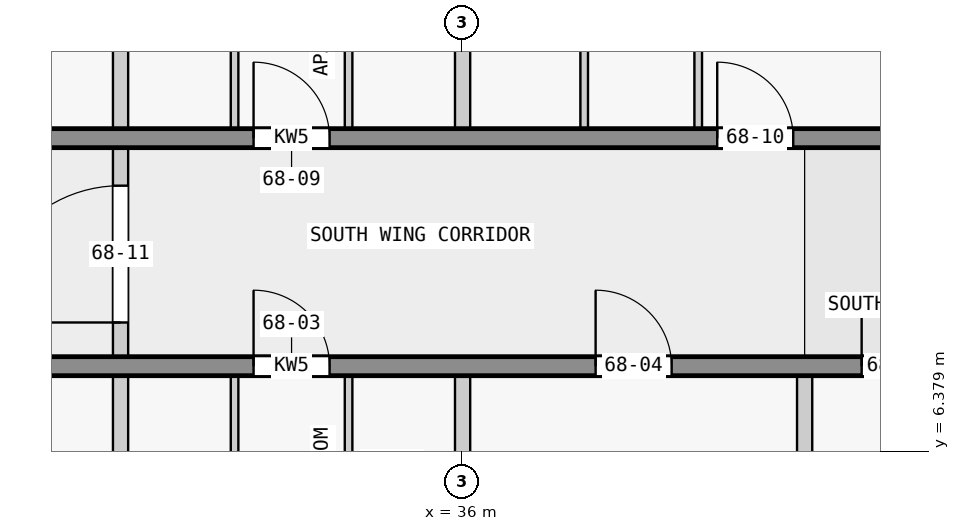
"""IFC4 building model, lengths in metres.
Left out: names, types, materials, properties, quantities, classifications, styles, units other than length and angle.
Written with IfcOpenShell. Run it as: python <this file> out.ifc"""

import sys

from ifc_helpers import new_model, si_unit, direction, frame, frame_2d, origin, place, context, subcontext, project, spatial, rectangle, extrude, element, fill, save


model = new_model("IFC4")
c1 = context("Model", 3, precision=1e-05, world=origin(), true_north=direction((0.0, 1.0)))
c2 = subcontext(c1, "Body", "Model", "MODEL_VIEW")
j1 = project(units=[si_unit("LENGTHUNIT", "METRE"), si_unit("PLANEANGLEUNIT", "RADIAN")], contexts=[c1])
p1 = place(None, origin())
s1 = spatial("IfcSite", under=j1, at=p1, CompositionType="ELEMENT")
p2 = place(p1, origin())
s2 = spatial("IfcBuilding", under=s1, at=p2, CompositionType="ELEMENT")
p3 = place(p2, frame((0.0, 0.0, 259.9)))
s3 = spatial("IfcBuildingStorey", under=s2, at=p3, CompositionType="ELEMENT", Elevation=259.9)
p4 = place(p3, frame((22.5, 7.5, 0.0), z_axis=(0.0, 0.0, 1.0), x_axis=(1.0, 0.0, 0.0)))
e1 = element("IfcWall", 1, at=p4, inside=s3, PredefinedType="SHEAR", context=c2, shape_type="SweptSolid", body=[
    extrude(rectangle(XDim=22.5, YDim=0.25, at=frame_2d((11.25, 0.0))), origin(), (0.0, 0.0, 1.0), 3.25),
])
p5 = place(p4, frame((1.75, 0.0, 0.0)))
e2 = element("IfcOpeningElement", 2, at=p5, cuts=e1, PredefinedType="OPENING", context=c2, shape_type="SweptSolid", body=[
    extrude(rectangle(XDim=1.0, YDim=2.1, at=frame_2d((0.5, 1.05))), frame((0.0, 0.135, 0.0), z_axis=(0.0, -1.0, 0.0), x_axis=(1.0, 0.0, 0.0)), (0.0, 0.0, 1.0), 0.27),
])
p6 = place(p4, frame((5.85, 0.0, 0.0)))
e3 = element("IfcOpeningElement", 3, at=p6, cuts=e1, PredefinedType="OPENING", context=c2, shape_type="SweptSolid", body=[
    extrude(rectangle(XDim=1.8, YDim=2.1, at=frame_2d((0.9, 1.05))), frame((0.0, 0.135, 0.0), z_axis=(0.0, -1.0, 0.0), x_axis=(1.0, 0.0, 0.0)), (0.0, 0.0, 1.0), 0.27),
])
p7 = place(p4, frame((10.75, 0.0, 0.0)))
e4 = element("IfcOpeningElement", 4, at=p7, cuts=e1, PredefinedType="OPENING", context=c2, shape_type="SweptSolid", body=[
    extrude(rectangle(XDim=1.0, YDim=2.1, at=frame_2d((0.5, 1.05))), frame((0.0, 0.135, 0.0), z_axis=(0.0, -1.0, 0.0), x_axis=(1.0, 0.0, 0.0)), (0.0, 0.0, 1.0), 0.27),
])
p8 = place(p4, frame((15.25, 0.0, 0.0)))
e5 = element("IfcOpeningElement", 5, at=p8, cuts=e1, PredefinedType="OPENING", context=c2, shape_type="SweptSolid", body=[
    extrude(rectangle(XDim=1.0, YDim=2.1, at=frame_2d((0.5, 1.05))), frame((0.0, 0.135, 0.0), z_axis=(0.0, -1.0, 0.0), x_axis=(1.0, 0.0, 0.0)), (0.0, 0.0, 1.0), 0.27),
])
p9 = place(p4, frame((18.75, 0.0, 0.0)))
e6 = element("IfcOpeningElement", 6, at=p9, cuts=e1, PredefinedType="OPENING", context=c2, shape_type="SweptSolid", body=[
    extrude(rectangle(XDim=0.9, YDim=2.1, at=frame_2d((0.45, 1.05))), frame((0.0, 0.135, 0.0), z_axis=(0.0, -1.0, 0.0), x_axis=(1.0, 0.0, 0.0)), (0.0, 0.0, 1.0), 0.27),
])
p10 = place(p4, frame((20.95, 0.0, 0.0)))
e7 = element("IfcOpeningElement", 7, at=p10, cuts=e1, PredefinedType="OPENING", context=c2, shape_type="SweptSolid", body=[
    extrude(rectangle(XDim=1.0, YDim=2.1, at=frame_2d((0.5, 1.05))), frame((0.0, 0.135, 0.0), z_axis=(0.0, -1.0, 0.0), x_axis=(1.0, 0.0, 0.0)), (0.0, 0.0, 1.0), 0.27),
])
p11 = place(p3, frame((22.5, 10.5, 0.0), z_axis=(0.0, 0.0, 1.0), x_axis=(1.0, 0.0, 0.0)))
e8 = element("IfcWall", 8, at=p11, inside=s3, PredefinedType="SHEAR", context=c2, shape_type="SweptSolid", body=[
    extrude(rectangle(XDim=22.5, YDim=0.25, at=frame_2d((11.25, 0.0))), origin(), (0.0, 0.0, 1.0), 3.25),
])
p12 = place(p11, frame((1.75, 0.0, 0.0)))
e9 = element("IfcOpeningElement", 9, at=p12, cuts=e8, PredefinedType="OPENING", context=c2, shape_type="SweptSolid", body=[
    extrude(rectangle(XDim=1.0, YDim=2.1, at=frame_2d((0.5, 1.05))), frame((0.0, 0.135, 0.0), z_axis=(0.0, -1.0, 0.0), x_axis=(1.0, 0.0, 0.0)), (0.0, 0.0, 1.0), 0.27),
])
p13 = place(p11, frame((6.25, 0.0, 0.0)))
e10 = element("IfcOpeningElement", 10, at=p13, cuts=e8, PredefinedType="OPENING", context=c2, shape_type="SweptSolid", body=[
    extrude(rectangle(XDim=1.0, YDim=2.1, at=frame_2d((0.5, 1.05))), frame((0.0, 0.135, 0.0), z_axis=(0.0, -1.0, 0.0), x_axis=(1.0, 0.0, 0.0)), (0.0, 0.0, 1.0), 0.27),
])
p14 = place(p11, frame((10.75, 0.0, 0.0)))
e11 = element("IfcOpeningElement", 11, at=p14, cuts=e8, PredefinedType="OPENING", context=c2, shape_type="SweptSolid", body=[
    extrude(rectangle(XDim=1.0, YDim=2.1, at=frame_2d((0.5, 1.05))), frame((0.0, 0.135, 0.0), z_axis=(0.0, -1.0, 0.0), x_axis=(1.0, 0.0, 0.0)), (0.0, 0.0, 1.0), 0.27),
])
p15 = place(p11, frame((16.85, 0.0, 0.0)))
e12 = element("IfcOpeningElement", 12, at=p15, cuts=e8, PredefinedType="OPENING", context=c2, shape_type="SweptSolid", body=[
    extrude(rectangle(XDim=1.0, YDim=2.1, at=frame_2d((0.5, 1.05))), frame((0.0, 0.135, 0.0), z_axis=(0.0, -1.0, 0.0), x_axis=(1.0, 0.0, 0.0)), (0.0, 0.0, 1.0), 0.27),
])
for number, where, z_axis, x_axis in (
    (13, (31.5, 1.122, 0.0), (0.0, 0.0, 1.0), (0.0, 1.0, 0.0)),
    (14, (31.5, 10.625, 0.0), (0.0, 0.0, 1.0), (0.0, 1.0, 0.0)),
):
    element("IfcWall", number, at=place(p3, frame(where, z_axis=z_axis, x_axis=x_axis)), inside=s3, PredefinedType="PARTITIONING", context=c2, shape_type="SweptSolid", body=[
        extrude(rectangle(XDim=6.253, YDim=0.2, at=frame_2d((3.126, 0.0))), origin(), (0.0, 0.0, 1.0), 3.25),
    ])
p16 = place(p3, frame((33.0, 3.975, 0.0), z_axis=(0.0, 0.0, 1.0), x_axis=(0.0, 1.0, 0.0)))
e15 = element("IfcWall", 15, at=p16, inside=s3, PredefinedType="PARTITIONING", context=c2, shape_type="SweptSolid", body=[
    extrude(rectangle(XDim=3.4, YDim=0.1, at=frame_2d((1.7, 0.0))), origin(), (0.0, 0.0, 1.0), 3.25),
])
p17 = place(p16, frame((1.25, 0.0, 0.0)))
e16 = element("IfcOpeningElement", 16, at=p17, cuts=e15, PredefinedType="OPENING", context=c2, shape_type="SweptSolid", body=[
    extrude(rectangle(XDim=0.9, YDim=2.1, at=frame_2d((0.45, 1.05))), frame((0.0, 0.06, 0.0), z_axis=(0.0, -1.0, 0.0), x_axis=(1.0, 0.0, 0.0)), (0.0, 0.0, 1.0), 0.12),
])
p18 = place(p3, frame((33.0, 10.625, 0.0), z_axis=(0.0, 0.0, 1.0), x_axis=(0.0, 1.0, 0.0)))
e17 = element("IfcWall", 17, at=p18, inside=s3, PredefinedType="PARTITIONING", context=c2, shape_type="SweptSolid", body=[
    extrude(rectangle(XDim=3.4, YDim=0.1, at=frame_2d((1.7, 0.0))), origin(), (0.0, 0.0, 1.0), 3.25),
])
p19 = place(p18, frame((1.25, 0.0, 0.0)))
e18 = element("IfcOpeningElement", 18, at=p19, cuts=e17, PredefinedType="OPENING", context=c2, shape_type="SweptSolid", body=[
    extrude(rectangle(XDim=0.9, YDim=2.1, at=frame_2d((0.45, 1.05))), frame((0.0, 0.06, 0.0), z_axis=(0.0, -1.0, 0.0), x_axis=(1.0, 0.0, 0.0)), (0.0, 0.0, 1.0), 0.12),
])
p20 = place(p3, frame((34.5, 7.375, 0.0), z_axis=(0.0, 0.0, 1.0), x_axis=(0.0, -1.0, 0.0)))
e19 = element("IfcWall", 19, at=p20, inside=s3, PredefinedType="PARTITIONING", context=c2, shape_type="SweptSolid", body=[
    extrude(rectangle(XDim=3.4, YDim=0.1, at=frame_2d((1.7, 0.0))), origin(), (0.0, 0.0, 1.0), 3.25),
])
p21 = place(p20, frame((1.25, 0.0, 0.0)))
e20 = element("IfcOpeningElement", 20, at=p21, cuts=e19, PredefinedType="OPENING", context=c2, shape_type="SweptSolid", body=[
    extrude(rectangle(XDim=0.9, YDim=2.1, at=frame_2d((0.45, 1.05))), frame((0.0, 0.06, 0.0), z_axis=(0.0, -1.0, 0.0), x_axis=(1.0, 0.0, 0.0)), (0.0, 0.0, 1.0), 0.12),
])
p22 = place(p3, frame((34.5, 13.975, 0.0), z_axis=(0.0, 0.0, 1.0), x_axis=(0.0, -1.0, 0.0)))
e21 = element("IfcWall", 21, at=p22, inside=s3, PredefinedType="PARTITIONING", context=c2, shape_type="SweptSolid", body=[
    extrude(rectangle(XDim=3.35, YDim=0.1, at=frame_2d((1.675, 0.0))), origin(), (0.0, 0.0, 1.0), 3.25),
])
p23 = place(p22, frame((1.25, 0.0, 0.0)))
e22 = element("IfcOpeningElement", 22, at=p23, cuts=e21, PredefinedType="OPENING", context=c2, shape_type="SweptSolid", body=[
    extrude(rectangle(XDim=0.9, YDim=2.1, at=frame_2d((0.45, 1.05))), frame((0.0, 0.06, 0.0), z_axis=(0.0, -1.0, 0.0), x_axis=(1.0, 0.0, 0.0)), (0.0, 0.0, 1.0), 0.12),
])
for number, where, z_axis, x_axis in (
    (23, (36.0, 3.975, 0.0), (0.0, 0.0, 1.0), (0.0, 1.0, 0.0)),
    (24, (36.0, 10.625, 0.0), (0.0, 0.0, 1.0), (0.0, 1.0, 0.0)),
):
    element("IfcWall", number, at=place(p3, frame(where, z_axis=z_axis, x_axis=x_axis)), inside=s3, PredefinedType="PARTITIONING", context=c2, shape_type="SweptSolid", body=[
        extrude(rectangle(XDim=3.4, YDim=0.2, at=frame_2d((1.7, 0.0))), origin(), (0.0, 0.0, 1.0), 3.25),
    ])
p24 = place(p3, frame((37.6, 10.625, 0.0), z_axis=(0.0, 0.0, 1.0), x_axis=(0.0, 1.0, 0.0)))
e25 = element("IfcWall", 25, at=p24, inside=s3, PredefinedType="PARTITIONING", context=c2, shape_type="SweptSolid", body=[
    extrude(rectangle(XDim=3.35, YDim=0.1, at=frame_2d((1.675, 0.0))), origin(), (0.0, 0.0, 1.0), 3.25),
])
p25 = place(p3, frame((39.1, 10.625, 0.0), z_axis=(0.0, 0.0, 1.0), x_axis=(0.0, 1.0, 0.0)))
e26 = element("IfcWall", 26, at=p25, inside=s3, PredefinedType="PARTITIONING", context=c2, shape_type="SweptSolid", body=[
    extrude(rectangle(XDim=3.35, YDim=0.1, at=frame_2d((1.675, 0.0))), origin(), (0.0, 0.0, 1.0), 3.25),
])
p26 = place(p25, frame((1.25, 0.0, 0.0)))
e27 = element("IfcOpeningElement", 27, at=p26, cuts=e26, PredefinedType="OPENING", context=c2, shape_type="SweptSolid", body=[
    extrude(rectangle(XDim=0.9, YDim=2.1, at=frame_2d((0.45, 1.05))), frame((0.0, 0.06, 0.0), z_axis=(0.0, -1.0, 0.0), x_axis=(1.0, 0.0, 0.0)), (0.0, 0.0, 1.0), 0.12),
])
p27 = place(p3, frame((40.5, 1.122, 0.0), z_axis=(0.0, 0.0, 1.0), x_axis=(0.0, 1.0, 0.0)))
e28 = element("IfcWall", 28, at=p27, inside=s3, PredefinedType="PARTITIONING", context=c2, shape_type="SweptSolid", body=[
    extrude(rectangle(XDim=6.253, YDim=0.2, at=frame_2d((3.126, 0.0))), origin(), (0.0, 0.0, 1.0), 3.25),
])
p28 = place(p3, frame((31.5, 7.475, 0.0), z_axis=(0.0, 0.0, 1.0), x_axis=(0.0, 1.0, 0.0)))
e29 = element("IfcWall", 29, at=p28, inside=s3, PredefinedType="PARTITIONING", context=c2, shape_type="SweptSolid", body=[
    extrude(rectangle(XDim=3.05, YDim=0.2, at=frame_2d((1.525, 0.0))), origin(), (0.0, 0.0, 1.0), 3.25),
])
p29 = place(p28, frame((0.6, 0.0, 0.0)))
e30 = element("IfcOpeningElement", 30, at=p29, cuts=e29, PredefinedType="OPENING", context=c2, shape_type="SweptSolid", body=[
    extrude(rectangle(XDim=1.8, YDim=2.1, at=frame_2d((0.9, 1.05))), frame((0.0, 0.11, 0.0), z_axis=(0.0, -1.0, 0.0), x_axis=(1.0, 0.0, 0.0)), (0.0, 0.0, 1.0), 0.22),
])
p30 = place(p7, origin())
e31 = element("IfcDoor", 31, at=p30, inside=s3, OperationType="SINGLE_SWING_LEFT", PredefinedType="DOOR", context=c2, shape_type="SweptSolid", body=[
    extrude(rectangle(XDim=1.0, YDim=2.1, at=frame_2d((0.5, 1.05))), frame((0.0, 0.025, 0.0), z_axis=(0.0, -1.0, 0.0), x_axis=(1.0, 0.0, 0.0)), (0.0, 0.0, 1.0), 0.05),
])
fill(e4, e31)
p31 = place(p8, origin())
e32 = element("IfcDoor", 32, at=p31, inside=s3, OperationType="SINGLE_SWING_RIGHT", PredefinedType="DOOR", context=c2, shape_type="SweptSolid", body=[
    extrude(rectangle(XDim=1.0, YDim=2.1, at=frame_2d((0.5, 1.05))), frame((0.0, 0.025, 0.0), z_axis=(0.0, -1.0, 0.0), x_axis=(1.0, 0.0, 0.0)), (0.0, 0.0, 1.0), 0.05),
])
fill(e5, e32)
p32 = place(p9, origin())
e33 = element("IfcDoor", 33, at=p32, inside=s3, OperationType="SINGLE_SWING_RIGHT", PredefinedType="DOOR", context=c2, shape_type="SweptSolid", body=[
    extrude(rectangle(XDim=0.9, YDim=2.1, at=frame_2d((0.45, 1.05))), frame((0.0, 0.025, 0.0), z_axis=(0.0, -1.0, 0.0), x_axis=(1.0, 0.0, 0.0)), (0.0, 0.0, 1.0), 0.05),
])
fill(e6, e33)
p33 = place(p14, origin())
e34 = element("IfcDoor", 34, at=p33, inside=s3, OperationType="SINGLE_SWING_LEFT", PredefinedType="DOOR", context=c2, shape_type="SweptSolid", body=[
    extrude(rectangle(XDim=1.0, YDim=2.1, at=frame_2d((0.5, 1.05))), frame((0.0, 0.025, 0.0), z_axis=(0.0, -1.0, 0.0), x_axis=(1.0, 0.0, 0.0)), (0.0, 0.0, 1.0), 0.05),
])
fill(e11, e34)
p34 = place(p15, origin())
e35 = element("IfcDoor", 35, at=p34, inside=s3, OperationType="SINGLE_SWING_RIGHT", PredefinedType="DOOR", context=c2, shape_type="SweptSolid", body=[
    extrude(rectangle(XDim=1.0, YDim=2.1, at=frame_2d((0.5, 1.05))), frame((0.0, 0.025, 0.0), z_axis=(0.0, -1.0, 0.0), x_axis=(1.0, 0.0, 0.0)), (0.0, 0.0, 1.0), 0.05),
])
fill(e12, e35)
p35 = place(p29, origin())
e36 = element("IfcDoor", 36, at=p35, inside=s3, OperationType="SINGLE_SWING_LEFT", PredefinedType="DOOR", context=c2, shape_type="SweptSolid", body=[
    extrude(rectangle(XDim=1.8, YDim=2.1, at=frame_2d((0.9, 1.05))), frame((0.0, 0.025, 0.0), z_axis=(0.0, -1.0, 0.0), x_axis=(1.0, 0.0, 0.0)), (0.0, 0.0, 1.0), 0.05),
])
fill(e30, e36)
save(model, sys.argv[1])
